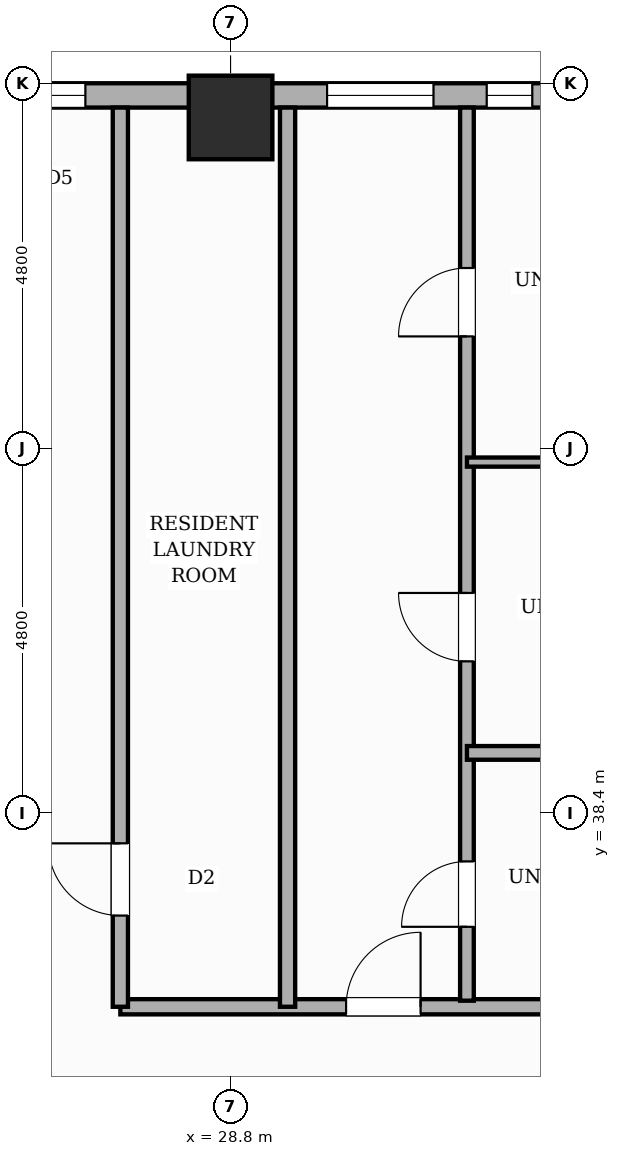
"""IFC4 building model, lengths in metres.
Left out: names, types, materials, properties, quantities, classifications, styles, units other than length and angle.
Written with IfcOpenShell. Run it as: python <this file> out.ifc"""

import sys

from ifc_helpers import new_model, si_unit, direction, frame, frame_2d, origin, origin_2d, place, context, subcontext, project, spatial, rectangle, extrude, element, fill, save


model = new_model("IFC4")
c1 = context("Model", 3, precision=1e-05, world=origin(), true_north=direction((0.0, 1.0)))
c2 = subcontext(c1, "Body", "Model", "MODEL_VIEW")
j1 = project(units=[si_unit("LENGTHUNIT", "METRE"), si_unit("PLANEANGLEUNIT", "RADIAN")], contexts=[c1])
p1 = place(None, origin())
s1 = spatial("IfcSite", under=j1, at=p1, CompositionType="ELEMENT")
p2 = place(p1, origin())
s2 = spatial("IfcBuilding", under=s1, at=p2, CompositionType="ELEMENT")
p3 = place(p2, frame((0.0, 0.0, 79.0)))
s3 = spatial("IfcBuildingStorey", under=s2, at=p3, CompositionType="ELEMENT", Elevation=79.0)
p4 = place(p3, frame((28.8, 47.55, 0.0), z_axis=(0.0, 0.0, 1.0), x_axis=(1.0, 0.0, 0.0)))
e1 = element("IfcColumn", 1, at=p4, inside=s3, PredefinedType="COLUMN", context=c2, shape_type="SweptSolid", body=[
    extrude(rectangle(XDim=1.1, YDim=1.1, at=origin_2d()), origin(), (0.0, 0.0, 1.0), 3.6),
])
p5 = place(p3, frame((7.2, 47.84, 0.0), z_axis=(0.0, 0.0, 1.0), x_axis=(1.0, 0.0, 0.0)))
e2 = element("IfcWall", 2, at=p5, inside=s3, PredefinedType="STANDARD", context=c2, shape_type="SweptSolid", body=[
    extrude(rectangle(XDim=48.0, YDim=0.32, at=frame_2d((24.0, 0.0))), origin(), (0.0, 0.0, 1.0), 2.53),
])
p6 = place(p5, frame((24.97, 0.0, 0.45)))
e3 = element("IfcOpeningElement", 3, at=p6, cuts=e2, PredefinedType="OPENING", context=c2, shape_type="SweptSolid", body=[
    extrude(rectangle(XDim=0.6, YDim=1.8, at=frame_2d((0.3, 0.9))), frame((0.0, 0.17, 0.0), z_axis=(0.0, -1.0, 0.0), x_axis=(1.0, 0.0, 0.0)), (0.0, 0.0, 1.0), 0.34),
])
p7 = place(p5, frame((29.44, 0.0, 0.45)))
e4 = element("IfcOpeningElement", 4, at=p7, cuts=e2, PredefinedType="OPENING", context=c2, shape_type="SweptSolid", body=[
    extrude(rectangle(XDim=0.95, YDim=1.8, at=frame_2d((0.475, 0.9))), frame((0.0, 0.17, 0.0), z_axis=(0.0, -1.0, 0.0), x_axis=(1.0, 0.0, 0.0)), (0.0, 0.0, 1.0), 0.34),
])
p8 = place(p5, frame((43.414, 0.0, 0.45)))
e5 = element("IfcOpeningElement", 5, at=p8, cuts=e2, PredefinedType="OPENING", context=c2, shape_type="SweptSolid", body=[
    extrude(rectangle(XDim=0.95, YDim=1.8, at=frame_2d((0.475, 0.9))), frame((0.0, 0.17, 0.0), z_axis=(0.0, -1.0, 0.0), x_axis=(1.0, 0.0, 0.0)), (0.0, 0.0, 1.0), 0.34),
])
p9 = place(p5, frame((18.74, 0.0, 0.45)))
e6 = element("IfcOpeningElement", 6, at=p9, cuts=e2, PredefinedType="OPENING", context=c2, shape_type="SweptSolid", body=[
    extrude(rectangle(XDim=0.95, YDim=1.8, at=frame_2d((0.475, 0.9))), frame((0.0, 0.17, 0.0), z_axis=(0.0, -1.0, 0.0), x_axis=(1.0, 0.0, 0.0)), (0.0, 0.0, 1.0), 0.34),
])
p10 = place(p5, frame((37.825, 0.0, 0.65)))
e7 = element("IfcOpeningElement", 7, at=p10, cuts=e2, PredefinedType="OPENING", context=c2, shape_type="SweptSolid", body=[
    extrude(rectangle(XDim=1.4, YDim=1.1, at=frame_2d((0.7, 0.55))), frame((0.0, 0.17, 0.0), z_axis=(0.0, -1.0, 0.0), x_axis=(1.0, 0.0, 0.0)), (0.0, 0.0, 1.0), 0.34),
])
p11 = place(p5, frame((0.47, 0.0, 0.45)))
e8 = element("IfcOpeningElement", 8, at=p11, cuts=e2, PredefinedType="OPENING", context=c2, shape_type="SweptSolid", body=[
    extrude(rectangle(XDim=0.95, YDim=1.8, at=frame_2d((0.475, 0.9))), frame((0.0, 0.17, 0.0), z_axis=(0.0, -1.0, 0.0), x_axis=(1.0, 0.0, 0.0)), (0.0, 0.0, 1.0), 0.34),
])
p12 = place(p5, frame((5.265, 0.0, 0.45)))
e9 = element("IfcOpeningElement", 9, at=p12, cuts=e2, PredefinedType="OPENING", context=c2, shape_type="SweptSolid", body=[
    extrude(rectangle(XDim=0.95, YDim=1.8, at=frame_2d((0.475, 0.9))), frame((0.0, 0.17, 0.0), z_axis=(0.0, -1.0, 0.0), x_axis=(1.0, 0.0, 0.0)), (0.0, 0.0, 1.0), 0.34),
])
p13 = place(p5, frame((22.87, 0.0, 0.65)))
e10 = element("IfcOpeningElement", 10, at=p13, cuts=e2, PredefinedType="OPENING", context=c2, shape_type="SweptSolid", body=[
    extrude(rectangle(XDim=1.4, YDim=1.1, at=frame_2d((0.7, 0.55))), frame((0.0, 0.17, 0.0), z_axis=(0.0, -1.0, 0.0), x_axis=(1.0, 0.0, 0.0)), (0.0, 0.0, 1.0), 0.34),
])
p14 = place(p5, frame((32.81, 0.0, 0.65)))
e11 = element("IfcOpeningElement", 11, at=p14, cuts=e2, PredefinedType="OPENING", context=c2, shape_type="SweptSolid", body=[
    extrude(rectangle(XDim=1.4, YDim=1.1, at=frame_2d((0.7, 0.55))), frame((0.0, 0.17, 0.0), z_axis=(0.0, -1.0, 0.0), x_axis=(1.0, 0.0, 0.0)), (0.0, 0.0, 1.0), 0.34),
])
p15 = place(p5, frame((41.809, 0.0, 0.45)))
e12 = element("IfcOpeningElement", 12, at=p15, cuts=e2, PredefinedType="OPENING", context=c2, shape_type="SweptSolid", body=[
    extrude(rectangle(XDim=0.95, YDim=1.8, at=frame_2d((0.475, 0.9))), frame((0.0, 0.17, 0.0), z_axis=(0.0, -1.0, 0.0), x_axis=(1.0, 0.0, 0.0)), (0.0, 0.0, 1.0), 0.34),
])
p16 = place(p3, frame((27.35, 35.85, 0.0), z_axis=(0.0, 0.0, 1.0), x_axis=(1.0, 0.0, 0.0)))
e13 = element("IfcWall", 13, at=p16, inside=s3, PredefinedType="PARTITIONING", context=c2, shape_type="SweptSolid", body=[
    extrude(rectangle(XDim=14.43, YDim=0.2, at=frame_2d((7.215, 0.0))), origin(), (0.0, 0.0, 1.0), 3.35),
])
p17 = place(p16, frame((2.97, 0.0, 0.0)))
e14 = element("IfcOpeningElement", 14, at=p17, cuts=e13, PredefinedType="OPENING", context=c2, shape_type="SweptSolid", body=[
    extrude(rectangle(XDim=0.98, YDim=2.18, at=frame_2d((0.49, 1.09))), frame((0.0, 0.11, 0.0), z_axis=(0.0, -1.0, 0.0), x_axis=(1.0, 0.0, 0.0)), (0.0, 0.0, 1.0), 0.22),
])
p18 = place(p16, frame((10.125, 0.0, 0.0)))
e15 = element("IfcOpeningElement", 15, at=p18, cuts=e13, PredefinedType="OPENING", context=c2, shape_type="SweptSolid", body=[
    extrude(rectangle(XDim=0.98, YDim=2.18, at=frame_2d((0.49, 1.09))), frame((0.0, 0.11, 0.0), z_axis=(0.0, -1.0, 0.0), x_axis=(1.0, 0.0, 0.0)), (0.0, 0.0, 1.0), 0.22),
])
p19 = place(p3, frame((27.35, 35.85, 0.0), z_axis=(0.0, 0.0, 1.0), x_axis=(0.0, 1.0, 0.0)))
e16 = element("IfcWall", 16, at=p19, inside=s3, PredefinedType="PARTITIONING", context=c2, shape_type="SweptSolid", body=[
    extrude(rectangle(XDim=11.83, YDim=0.2, at=frame_2d((5.915, 0.0))), origin(), (0.0, 0.0, 1.0), 3.35),
])
p20 = place(p19, frame((1.2, 0.0, 0.0)))
e17 = element("IfcOpeningElement", 17, at=p20, cuts=e16, PredefinedType="OPENING", context=c2, shape_type="SweptSolid", body=[
    extrude(rectangle(XDim=0.95, YDim=2.15, at=frame_2d((0.475, 1.075))), frame((0.0, 0.11, 0.0), z_axis=(0.0, -1.0, 0.0), x_axis=(1.0, 0.0, 0.0)), (0.0, 0.0, 1.0), 0.22),
])
p21 = place(p3, frame((29.55, 35.85, 0.0), z_axis=(0.0, 0.0, 1.0), x_axis=(0.0, 1.0, 0.0)))
e18 = element("IfcWall", 18, at=p21, inside=s3, PredefinedType="SOLIDWALL", context=c2, shape_type="SweptSolid", body=[
    extrude(rectangle(XDim=11.83, YDim=0.2, at=frame_2d((5.915, 0.0))), origin(), (0.0, 0.0, 1.0), 3.35),
])
p22 = place(p3, frame((31.91, 35.93, 0.0), z_axis=(0.0, 0.0, 1.0), x_axis=(0.0, 1.0, 0.0)))
e19 = element("IfcWall", 19, at=p22, inside=s3, PredefinedType="PLUMBINGWALL", context=c2, shape_type="SweptSolid", body=[
    extrude(rectangle(XDim=11.75, YDim=0.18, at=frame_2d((5.875, 0.0))), origin(), (0.0, 0.0, 1.0), 3.35),
])
p23 = place(p22, frame((0.972, 0.0, 0.0)))
e20 = element("IfcOpeningElement", 20, at=p23, cuts=e19, PredefinedType="OPENING", context=c2, shape_type="SweptSolid", body=[
    extrude(rectangle(XDim=0.86, YDim=2.1, at=frame_2d((0.43, 1.05))), frame((0.0, 0.1, 0.0), z_axis=(0.0, -1.0, 0.0), x_axis=(1.0, 0.0, 0.0)), (0.0, 0.0, 1.0), 0.2),
])
p24 = place(p22, frame((4.464, 0.0, 0.0)))
e21 = element("IfcOpeningElement", 21, at=p24, cuts=e19, PredefinedType="OPENING", context=c2, shape_type="SweptSolid", body=[
    extrude(rectangle(XDim=0.9, YDim=2.15, at=frame_2d((0.45, 1.075))), frame((0.0, 0.1, 0.0), z_axis=(0.0, -1.0, 0.0), x_axis=(1.0, 0.0, 0.0)), (0.0, 0.0, 1.0), 0.2),
])
p25 = place(p22, frame((8.739, 0.0, 0.0)))
e22 = element("IfcOpeningElement", 22, at=p25, cuts=e19, PredefinedType="OPENING", context=c2, shape_type="SweptSolid", body=[
    extrude(rectangle(XDim=0.9, YDim=2.15, at=frame_2d((0.45, 1.075))), frame((0.0, 0.1, 0.0), z_axis=(0.0, -1.0, 0.0), x_axis=(1.0, 0.0, 0.0)), (0.0, 0.0, 1.0), 0.2),
])
p26 = place(p3, frame((31.91, 39.19, 0.0), z_axis=(0.0, 0.0, 1.0), x_axis=(1.0, 0.0, 0.0)))
e23 = element("IfcWall", 23, at=p26, inside=s3, PredefinedType="PLUMBINGWALL", context=c2, shape_type="SweptSolid", body=[
    extrude(rectangle(XDim=4.51, YDim=0.18, at=frame_2d((2.255, 0.0))), origin(), (0.0, 0.0, 1.0), 3.35),
])
p27 = place(p3, frame((31.91, 43.016, 0.0), z_axis=(0.0, 0.0, 1.0), x_axis=(1.0, 0.0, 0.0)))
e24 = element("IfcWall", 24, at=p27, inside=s3, PredefinedType="PARTITIONING", context=c2, shape_type="SweptSolid", body=[
    extrude(rectangle(XDim=4.51, YDim=0.12, at=frame_2d((2.255, 0.0))), origin(), (0.0, 0.0, 1.0), 3.35),
])
p28 = place(p6, origin())
e25 = element("IfcWindow", 25, at=p28, inside=s3, PartitioningType="SINGLE_PANEL", PredefinedType="WINDOW", context=c2, shape_type="SweptSolid", body=[
    extrude(rectangle(XDim=0.6, YDim=1.8, at=frame_2d((0.3, 0.9))), frame((0.0, 0.03, 0.0), z_axis=(0.0, -1.0, 0.0), x_axis=(1.0, 0.0, 0.0)), (0.0, 0.0, 1.0), 0.06),
])
fill(e3, e25)
p29 = place(p9, origin())
e26 = element("IfcWindow", 26, at=p29, inside=s3, PartitioningType="SINGLE_PANEL", PredefinedType="WINDOW", context=c2, shape_type="SweptSolid", body=[
    extrude(rectangle(XDim=0.95, YDim=1.8, at=frame_2d((0.475, 0.9))), frame((0.0, 0.03, 0.0), z_axis=(0.0, -1.0, 0.0), x_axis=(1.0, 0.0, 0.0)), (0.0, 0.0, 1.0), 0.06),
])
fill(e6, e26)
p30 = place(p13, origin())
e27 = element("IfcWindow", 27, at=p30, inside=s3, PartitioningType="SINGLE_PANEL", PredefinedType="WINDOW", context=c2, shape_type="SweptSolid", body=[
    extrude(rectangle(XDim=1.4, YDim=1.1, at=frame_2d((0.7, 0.55))), frame((0.0, 0.03, 0.0), z_axis=(0.0, -1.0, 0.0), x_axis=(1.0, 0.0, 0.0)), (0.0, 0.0, 1.0), 0.06),
])
fill(e10, e27)
p31 = place(p20, origin())
e28 = element("IfcDoor", 28, at=p31, inside=s3, OperationType="SINGLE_SWING_RIGHT", PredefinedType="DOOR", context=c2, shape_type="SweptSolid", body=[
    extrude(rectangle(XDim=0.95, YDim=2.15, at=frame_2d((0.475, 1.075))), frame((0.0, 0.025, 0.0), z_axis=(0.0, -1.0, 0.0), x_axis=(1.0, 0.0, 0.0)), (0.0, 0.0, 1.0), 0.05),
])
fill(e17, e28)
p32 = place(p17, origin())
e29 = element("IfcDoor", 29, at=p32, inside=s3, OperationType="SINGLE_SWING_RIGHT", PredefinedType="DOOR", context=c2, shape_type="SweptSolid", body=[
    extrude(rectangle(XDim=0.98, YDim=2.18, at=frame_2d((0.49, 1.09))), frame((0.0, 0.025, 0.0), z_axis=(0.0, -1.0, 0.0), x_axis=(1.0, 0.0, 0.0)), (0.0, 0.0, 1.0), 0.05),
])
fill(e14, e29)
p33 = place(p23, origin())
e30 = element("IfcDoor", 30, at=p33, inside=s3, OperationType="SINGLE_SWING_LEFT", PredefinedType="DOOR", context=c2, shape_type="SweptSolid", body=[
    extrude(rectangle(XDim=0.86, YDim=2.1, at=frame_2d((0.43, 1.05))), frame((0.0, 0.025, 0.0), z_axis=(0.0, -1.0, 0.0), x_axis=(1.0, 0.0, 0.0)), (0.0, 0.0, 1.0), 0.05),
])
fill(e20, e30)
p34 = place(p24, origin())
e31 = element("IfcDoor", 31, at=p34, inside=s3, OperationType="SINGLE_SWING_RIGHT", PredefinedType="DOOR", context=c2, shape_type="SweptSolid", body=[
    extrude(rectangle(XDim=0.9, YDim=2.15, at=frame_2d((0.45, 1.075))), frame((0.0, 0.025, 0.0), z_axis=(0.0, -1.0, 0.0), x_axis=(1.0, 0.0, 0.0)), (0.0, 0.0, 1.0), 0.05),
])
fill(e21, e31)
p35 = place(p25, origin())
e32 = element("IfcDoor", 32, at=p35, inside=s3, OperationType="SINGLE_SWING_LEFT", PredefinedType="DOOR", context=c2, shape_type="SweptSolid", body=[
    extrude(rectangle(XDim=0.9, YDim=2.15, at=frame_2d((0.45, 1.075))), frame((0.0, 0.025, 0.0), z_axis=(0.0, -1.0, 0.0), x_axis=(1.0, 0.0, 0.0)), (0.0, 0.0, 1.0), 0.05),
])
fill(e22, e32)
save(model, sys.argv[1])
